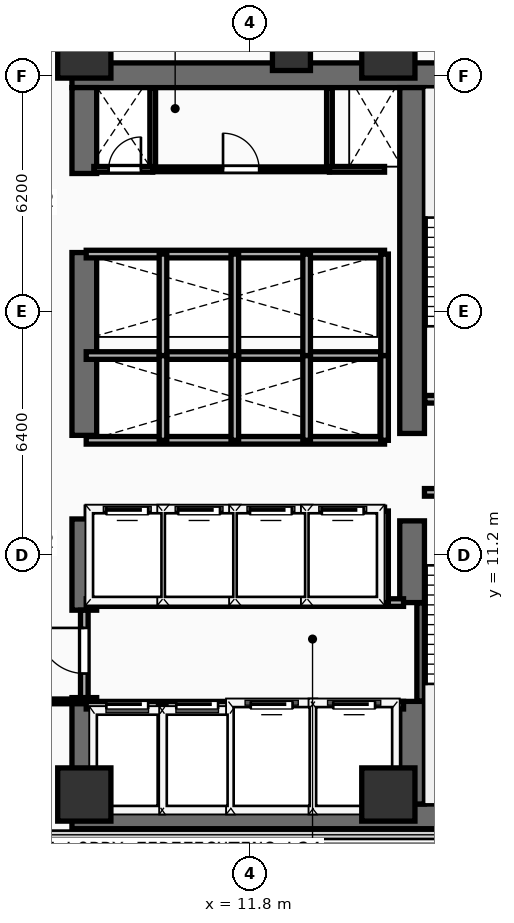
"""IFC4 building model, lengths in metres.
Left out: names, types, materials, properties, quantities, classifications, styles, units other than length and angle.
Written with IfcOpenShell. Run it as: python <this file> out.ifc"""

import sys

from ifc_helpers import new_model, si_unit, direction, frame, frame_2d, origin, origin_2d, place, context, subcontext, project, spatial, rectangle, extrude, element, fill, save


model = new_model("IFC4")
c1 = context("Model", 3, precision=1e-05, world=origin(), true_north=direction((0.0, 1.0)))
c2 = subcontext(c1, "Body", "Model", "MODEL_VIEW")
j1 = project(units=[si_unit("LENGTHUNIT", "METRE"), si_unit("PLANEANGLEUNIT", "RADIAN")], contexts=[c1])
p1 = place(None, origin())
s1 = spatial("IfcSite", under=j1, at=p1, CompositionType="ELEMENT")
p2 = place(p1, origin())
s2 = spatial("IfcBuilding", under=s1, at=p2, CompositionType="ELEMENT")
p3 = place(p2, frame((0.0, 0.0, 95.5)))
s3 = spatial("IfcBuildingStorey", under=s2, at=p3, CompositionType="ELEMENT", Elevation=95.5)
for number, where, z_axis, x_axis in (
    (1, (7.125, 4.325, 0.0), (0.0, 0.0, 1.0), (1.0, 0.0, 0.0)),
    (2, (7.125, 23.825, 0.0), (0.0, 0.0, 1.0), (1.0, 0.0, 0.0)),
):
    element("IfcWall", number, at=place(p3, frame(where, z_axis=z_axis, x_axis=x_axis)), inside=s3, PredefinedType="SHEAR", context=c2, shape_type="SweptSolid", body=[
        extrude(rectangle(XDim=14.0, YDim=0.65, at=frame_2d((7.0, 0.0))), origin(), (0.0, 0.0, 1.0), 3.54),
    ])
p4 = place(p3, frame((7.45, 4.65, 0.0), z_axis=(0.0, 0.0, 1.0), x_axis=(0.0, 1.0, 0.0)))
e3 = element("IfcWall", 3, at=p4, inside=s3, PredefinedType="SHEAR", context=c2, shape_type="SweptSolid", body=[
    extrude(rectangle(XDim=2.8, YDim=0.65, at=frame_2d((1.4, 0.0))), origin(), (0.0, 0.0, 1.0), 3.54),
])
p5 = place(p3, frame((7.45, 9.75, 0.0), z_axis=(0.0, 0.0, 1.0), x_axis=(0.0, 1.0, 0.0)))
e4 = element("IfcWall", 4, at=p5, inside=s3, PredefinedType="SHEAR", context=c2, shape_type="SweptSolid", body=[
    extrude(rectangle(XDim=2.4, YDim=0.65, at=frame_2d((1.2, 0.0))), origin(), (0.0, 0.0, 1.0), 3.54),
])
p6 = place(p3, frame((7.45, 14.35, 0.0), z_axis=(0.0, 0.0, 1.0), x_axis=(0.0, 1.0, 0.0)))
e5 = element("IfcWall", 5, at=p6, inside=s3, PredefinedType="SHEAR", context=c2, shape_type="SweptSolid", body=[
    extrude(rectangle(XDim=4.81, YDim=0.65, at=frame_2d((2.405, 0.0))), origin(), (0.0, 0.0, 1.0), 3.54),
])
p7 = place(p3, frame((7.45, 21.24, 0.0), z_axis=(0.0, 0.0, 1.0), x_axis=(0.0, 1.0, 0.0)))
e6 = element("IfcWall", 6, at=p7, inside=s3, PredefinedType="SHEAR", context=c2, shape_type="SweptSolid", body=[
    extrude(rectangle(XDim=2.26, YDim=0.65, at=frame_2d((1.13, 0.0))), origin(), (0.0, 0.0, 1.0), 3.54),
])
p8 = place(p3, frame((16.075, 4.65, 0.0), z_axis=(0.0, 0.0, 1.0), x_axis=(0.0, 1.0, 0.0)))
e7 = element("IfcWall", 7, at=p8, inside=s3, PredefinedType="SHEAR", context=c2, shape_type="SweptSolid", body=[
    extrude(rectangle(XDim=2.7, YDim=0.65, at=frame_2d((1.35, 0.0))), origin(), (0.0, 0.0, 1.0), 3.54),
])
p9 = place(p3, frame((16.075, 9.95, 0.0), z_axis=(0.0, 0.0, 1.0), x_axis=(0.0, 1.0, 0.0)))
e8 = element("IfcWall", 8, at=p9, inside=s3, PredefinedType="SHEAR", context=c2, shape_type="SweptSolid", body=[
    extrude(rectangle(XDim=2.15, YDim=0.65, at=frame_2d((1.075, 0.0))), origin(), (0.0, 0.0, 1.0), 3.54),
])
p10 = place(p3, frame((16.075, 14.4, 0.0), z_axis=(0.0, 0.0, 1.0), x_axis=(0.0, 1.0, 0.0)))
e9 = element("IfcWall", 9, at=p10, inside=s3, PredefinedType="SHEAR", context=c2, shape_type="SweptSolid", body=[
    extrude(rectangle(XDim=9.1, YDim=0.65, at=frame_2d((4.55, 0.0))), origin(), (0.0, 0.0, 1.0), 3.54),
])
for number, where, z_axis, x_axis in (
    (10, (7.45, 4.9, 0.0), (0.0, 0.0, 1.0), (1.0, 0.0, 0.0)),
    (11, (15.45, 4.9, 0.0), (0.0, 0.0, 1.0), (1.0, 0.0, 0.0)),
    (12, (7.45, 24.45, 0.0), (0.0, 0.0, 1.0), (1.0, 0.0, 0.0)),
    (13, (15.45, 24.45, 0.0), (0.0, 0.0, 1.0), (1.0, 0.0, 0.0)),
):
    element("IfcColumn", number, at=place(p3, frame(where, z_axis=z_axis, x_axis=x_axis)), inside=s3, PredefinedType="COLUMN", context=c2, shape_type="SweptSolid", body=[
        extrude(rectangle(XDim=1.4, YDim=1.4, at=origin_2d()), origin(), (0.0, 0.0, 1.0), 3.54),
    ])
p11 = place(p3, frame((12.9, 24.45, 0.0), z_axis=(0.0, 0.0, 1.0), x_axis=(1.0, 0.0, 0.0)))
e14 = element("IfcColumn", 14, at=p11, inside=s3, PredefinedType="COLUMN", context=c2, shape_type="SweptSolid", body=[
    extrude(rectangle(XDim=1.0, YDim=1.0, at=origin_2d()), origin(), (0.0, 0.0, 1.0), 3.54),
])
p12 = place(p3, frame((16.3, 7.36, 0.0), z_axis=(0.0, 0.0, 1.0), x_axis=(0.0, 1.0, 0.0)))
e15 = element("IfcWall", 15, at=p12, inside=s3, PredefinedType="SHEAR", context=c2, shape_type="SweptSolid", body=[
    extrude(rectangle(XDim=2.58, YDim=0.2, at=frame_2d((1.29, 0.0))), origin(), (0.0, 0.0, 1.0), 3.54),
])
p13 = place(p3, frame((16.4, 12.85, 0.0), z_axis=(0.0, 0.0, 1.0), x_axis=(1.0, 0.0, 0.0)))
e16 = element("IfcWall", 16, at=p13, inside=s3, PredefinedType="PARTITIONING", context=c2, shape_type="SweptSolid", body=[
    extrude(rectangle(XDim=3.96, YDim=0.2, at=frame_2d((1.98, 0.0))), origin(), (0.0, 0.0, 1.0), 3.54),
])
p14 = place(p13, frame((1.304, 0.0, 0.0)))
e17 = element("IfcOpeningElement", 17, at=p14, cuts=e16, PredefinedType="OPENING", context=c2, shape_type="SweptSolid", body=[
    extrude(rectangle(XDim=1.1, YDim=2.2, at=frame_2d((0.55, 1.1))), frame((0.0, 0.11, 0.0), z_axis=(0.0, -1.0, 0.0), x_axis=(1.0, 0.0, 0.0)), (0.0, 0.0, 1.0), 0.22),
])
p15 = place(p3, frame((16.41, 15.3, 0.0), z_axis=(0.0, 0.0, 1.0), x_axis=(1.0, 0.0, 0.0)))
e18 = element("IfcWall", 18, at=p15, inside=s3, PredefinedType="PARTITIONING", context=c2, shape_type="SweptSolid", body=[
    extrude(rectangle(XDim=3.95, YDim=0.2, at=frame_2d((1.975, 0.0))), origin(), (0.0, 0.0, 1.0), 3.54),
])
p16 = place(p15, frame((1.294, 0.0, 0.0)))
e19 = element("IfcOpeningElement", 19, at=p16, cuts=e18, PredefinedType="OPENING", context=c2, shape_type="SweptSolid", body=[
    extrude(rectangle(XDim=1.1, YDim=2.2, at=frame_2d((0.55, 1.1))), frame((0.0, 0.11, 0.0), z_axis=(0.0, -1.0, 0.0), x_axis=(1.0, 0.0, 0.0)), (0.0, 0.0, 1.0), 0.22),
])
p17 = place(p3, frame((7.5, 7.25, 0.0), z_axis=(0.0, 0.0, 1.0), x_axis=(1.0, 0.0, 0.0)))
e20 = element("IfcWall", 20, at=p17, inside=s3, PredefinedType="PARTITIONING", context=c2, shape_type="SweptSolid", body=[
    extrude(rectangle(XDim=8.35, YDim=0.2, at=frame_2d((4.175, 0.0))), origin(), (0.0, 0.0, 1.0), 3.54),
])
p18 = place(p17, frame((0.53, 0.0, 0.0)))
e21 = element("IfcOpeningElement", 21, at=p18, cuts=e20, PredefinedType="OPENING", context=c2, shape_type="SweptSolid", body=[
    extrude(rectangle(XDim=1.1, YDim=2.2, at=frame_2d((0.55, 1.1))), frame((0.0, 0.11, 0.0), z_axis=(0.0, -1.0, 0.0), x_axis=(1.0, 0.0, 0.0)), (0.0, 0.0, 1.0), 0.22),
])
p19 = place(p17, frame((2.37, 0.0, 0.0)))
e22 = element("IfcOpeningElement", 22, at=p19, cuts=e20, PredefinedType="OPENING", context=c2, shape_type="SweptSolid", body=[
    extrude(rectangle(XDim=1.1, YDim=2.2, at=frame_2d((0.55, 1.1))), frame((0.0, 0.11, 0.0), z_axis=(0.0, -1.0, 0.0), x_axis=(1.0, 0.0, 0.0)), (0.0, 0.0, 1.0), 0.22),
])
p20 = place(p17, frame((4.33, 0.0, 0.0)))
e23 = element("IfcOpeningElement", 23, at=p20, cuts=e20, PredefinedType="OPENING", context=c2, shape_type="SweptSolid", body=[
    extrude(rectangle(XDim=1.1, YDim=2.2, at=frame_2d((0.55, 1.1))), frame((0.0, 0.11, 0.0), z_axis=(0.0, -1.0, 0.0), x_axis=(1.0, 0.0, 0.0)), (0.0, 0.0, 1.0), 0.22),
])
p21 = place(p17, frame((6.5, 0.0, 0.0)))
e24 = element("IfcOpeningElement", 24, at=p21, cuts=e20, PredefinedType="OPENING", context=c2, shape_type="SweptSolid", body=[
    extrude(rectangle(XDim=1.1, YDim=2.2, at=frame_2d((0.55, 1.1))), frame((0.0, 0.11, 0.0), z_axis=(0.0, -1.0, 0.0), x_axis=(1.0, 0.0, 0.0)), (0.0, 0.0, 1.0), 0.22),
])
p22 = place(p3, frame((7.5, 9.95, 0.0), z_axis=(0.0, 0.0, 1.0), x_axis=(1.0, 0.0, 0.0)))
e25 = element("IfcWall", 25, at=p22, inside=s3, PredefinedType="PARTITIONING", context=c2, shape_type="SweptSolid", body=[
    extrude(rectangle(XDim=8.35, YDim=0.2, at=frame_2d((4.175, 0.0))), origin(), (0.0, 0.0, 1.0), 3.54),
])
for number, where, z_axis, x_axis in (
    (26, (9.5, 4.45, 0.0), (0.0, 0.0, 1.0), (0.0, 1.0, 0.0)),
    (27, (11.36, 4.45, 0.0), (0.0, 0.0, 1.0), (0.0, 1.0, 0.0)),
    (28, (13.46, 4.45, 0.0), (0.0, 0.0, 1.0), (0.0, 1.0, 0.0)),
):
    element("IfcWall", number, at=place(p3, frame(where, z_axis=z_axis, x_axis=x_axis)), inside=s3, PredefinedType="PARTITIONING", context=c2, shape_type="SweptSolid", body=[
        extrude(rectangle(XDim=2.8, YDim=0.2, at=frame_2d((1.4, 0.0))), origin(), (0.0, 0.0, 1.0), 3.54),
    ])
p23 = place(p3, frame((7.45, 7.45, 0.0), z_axis=(0.0, 0.0, 1.0), x_axis=(0.0, 1.0, 0.0)))
e29 = element("IfcWall", 29, at=p23, inside=s3, PredefinedType="PARTITIONING", context=c2, shape_type="SweptSolid", body=[
    extrude(rectangle(XDim=2.3, YDim=0.2, at=frame_2d((1.15, 0.0))), origin(), (0.0, 0.0, 1.0), 2.52),
])
p24 = place(p23, frame((0.633, 0.0, 0.0)))
e30 = element("IfcOpeningElement", 30, at=p24, cuts=e29, PredefinedType="OPENING", context=c2, shape_type="SweptSolid", body=[
    extrude(rectangle(XDim=1.2, YDim=2.25, at=frame_2d((0.6, 1.125))), frame((0.0, 0.11, 0.0), z_axis=(0.0, -1.0, 0.0), x_axis=(1.0, 0.0, 0.0)), (0.0, 0.0, 1.0), 0.22),
])
p25 = place(p3, frame((7.5, 12.36, 0.0), z_axis=(0.0, 0.0, 1.0), x_axis=(1.0, 0.0, 0.0)))
e31 = element("IfcWall", 31, at=p25, inside=s3, PredefinedType="PARTITIONING", context=c2, shape_type="SweptSolid", body=[
    extrude(rectangle(XDim=7.85, YDim=0.2, at=frame_2d((3.925, 0.0))), origin(), (0.0, 0.0, 1.0), 3.54),
])
p26 = place(p25, frame((0.53, 0.0, 0.0)))
e32 = element("IfcOpeningElement", 32, at=p26, cuts=e31, PredefinedType="OPENING", context=c2, shape_type="SweptSolid", body=[
    extrude(rectangle(XDim=1.1, YDim=2.2, at=frame_2d((0.55, 1.1))), frame((0.0, 0.11, 0.0), z_axis=(0.0, -1.0, 0.0), x_axis=(1.0, 0.0, 0.0)), (0.0, 0.0, 1.0), 0.22),
])
p27 = place(p25, frame((2.42, 0.0, 0.0)))
e33 = element("IfcOpeningElement", 33, at=p27, cuts=e31, PredefinedType="OPENING", context=c2, shape_type="SweptSolid", body=[
    extrude(rectangle(XDim=1.1, YDim=2.2, at=frame_2d((0.55, 1.1))), frame((0.0, 0.11, 0.0), z_axis=(0.0, -1.0, 0.0), x_axis=(1.0, 0.0, 0.0)), (0.0, 0.0, 1.0), 0.22),
])
p28 = place(p25, frame((4.31, 0.0, 0.0)))
e34 = element("IfcOpeningElement", 34, at=p28, cuts=e31, PredefinedType="OPENING", context=c2, shape_type="SweptSolid", body=[
    extrude(rectangle(XDim=1.1, YDim=2.2, at=frame_2d((0.55, 1.1))), frame((0.0, 0.11, 0.0), z_axis=(0.0, -1.0, 0.0), x_axis=(1.0, 0.0, 0.0)), (0.0, 0.0, 1.0), 0.22),
])
p29 = place(p25, frame((6.2, 0.0, 0.0)))
e35 = element("IfcOpeningElement", 35, at=p29, cuts=e31, PredefinedType="OPENING", context=c2, shape_type="SweptSolid", body=[
    extrude(rectangle(XDim=1.1, YDim=2.2, at=frame_2d((0.55, 1.1))), frame((0.0, 0.11, 0.0), z_axis=(0.0, -1.0, 0.0), x_axis=(1.0, 0.0, 0.0)), (0.0, 0.0, 1.0), 0.22),
])
for number, where, z_axis, x_axis in (
    (36, (15.35, 9.95, 0.0), (0.0, 0.0, 1.0), (0.0, 1.0, 0.0)),
    (37, (9.52, 9.95, 0.0), (0.0, 0.0, 1.0), (0.0, 1.0, 0.0)),
    (38, (11.41, 9.95, 0.0), (0.0, 0.0, 1.0), (0.0, 1.0, 0.0)),
    (39, (13.3, 9.95, 0.0), (0.0, 0.0, 1.0), (0.0, 1.0, 0.0)),
):
    element("IfcWall", number, at=place(p3, frame(where, z_axis=z_axis, x_axis=x_axis)), inside=s3, PredefinedType="PARTITIONING", context=c2, shape_type="SweptSolid", body=[
        extrude(rectangle(XDim=2.41, YDim=0.2, at=frame_2d((1.205, 0.0))), origin(), (0.0, 0.0, 1.0), 3.54),
    ])
for number, where, z_axis, x_axis in (
    (40, (7.5, 14.22, 0.0), (0.0, 0.0, 1.0), (1.0, 0.0, 0.0)),
    (41, (7.5, 16.45, 0.0), (0.0, 0.0, 1.0), (1.0, 0.0, 0.0)),
):
    element("IfcWall", number, at=place(p3, frame(where, z_axis=z_axis, x_axis=x_axis)), inside=s3, PredefinedType="PARTITIONING", context=c2, shape_type="SweptSolid", body=[
        extrude(rectangle(XDim=7.85, YDim=0.2, at=frame_2d((3.925, 0.0))), origin(), (0.0, 0.0, 1.0), 3.54),
    ])
for number, where, z_axis, x_axis in (
    (42, (15.35, 14.22, 0.0), (0.0, 0.0, 1.0), (0.0, 1.0, 0.0)),
    (43, (9.52, 14.22, 0.0), (0.0, 0.0, 1.0), (0.0, 1.0, 0.0)),
    (44, (11.41, 14.22, 0.0), (0.0, 0.0, 1.0), (0.0, 1.0, 0.0)),
    (45, (13.3, 14.22, 0.0), (0.0, 0.0, 1.0), (0.0, 1.0, 0.0)),
):
    element("IfcWall", number, at=place(p3, frame(where, z_axis=z_axis, x_axis=x_axis)), inside=s3, PredefinedType="PARTITIONING", context=c2, shape_type="SweptSolid", body=[
        extrude(rectangle(XDim=2.23, YDim=0.2, at=frame_2d((1.115, 0.0))), origin(), (0.0, 0.0, 1.0), 3.54),
    ])
p30 = place(p3, frame((7.5, 19.12, 0.0), z_axis=(0.0, 0.0, 1.0), x_axis=(1.0, 0.0, 0.0)))
e46 = element("IfcWall", 46, at=p30, inside=s3, PredefinedType="PARTITIONING", context=c2, shape_type="SweptSolid", body=[
    extrude(rectangle(XDim=7.85, YDim=0.2, at=frame_2d((3.925, 0.0))), origin(), (0.0, 0.0, 1.0), 3.54),
])
for number, where, z_axis, x_axis in (
    (47, (15.35, 16.45, 0.0), (0.0, 0.0, 1.0), (0.0, 1.0, 0.0)),
    (48, (9.52, 16.45, 0.0), (0.0, 0.0, 1.0), (0.0, 1.0, 0.0)),
    (49, (11.41, 16.45, 0.0), (0.0, 0.0, 1.0), (0.0, 1.0, 0.0)),
    (50, (13.3, 16.45, 0.0), (0.0, 0.0, 1.0), (0.0, 1.0, 0.0)),
):
    element("IfcWall", number, at=place(p3, frame(where, z_axis=z_axis, x_axis=x_axis)), inside=s3, PredefinedType="PARTITIONING", context=c2, shape_type="SweptSolid", body=[
        extrude(rectangle(XDim=2.67, YDim=0.2, at=frame_2d((1.335, 0.0))), origin(), (0.0, 0.0, 1.0), 3.54),
    ])
for number, where, z_axis, x_axis in (
    (51, (9.25, 21.35, 0.0), (0.0, 0.0, 1.0), (0.0, 1.0, 0.0)),
    (52, (13.9, 21.35, 0.0), (0.0, 0.0, 1.0), (0.0, 1.0, 0.0)),
):
    element("IfcWall", number, at=place(p3, frame(where, z_axis=z_axis, x_axis=x_axis)), inside=s3, PredefinedType="PARTITIONING", context=c2, shape_type="SweptSolid", body=[
        extrude(rectangle(XDim=2.13, YDim=0.15, at=frame_2d((1.065, 0.0))), origin(), (0.0, 0.0, 1.0), 3.54),
    ])
p31 = place(p3, frame((7.7, 21.35, 0.0), z_axis=(0.0, 0.0, 1.0), x_axis=(1.0, 0.0, 0.0)))
e53 = element("IfcWall", 53, at=p31, inside=s3, PredefinedType="PARTITIONING", context=c2, shape_type="SweptSolid", body=[
    extrude(rectangle(XDim=1.55, YDim=0.15, at=frame_2d((0.775, 0.0))), origin(), (0.0, 0.0, 1.0), 3.54),
])
p32 = place(p31, frame((0.39, 0.0, 0.0)))
e54 = element("IfcOpeningElement", 54, at=p32, cuts=e53, PredefinedType="OPENING", context=c2, shape_type="SweptSolid", body=[
    extrude(rectangle(XDim=0.85, YDim=2.15, at=frame_2d((0.425, 1.075))), frame((0.0, 0.085, 0.0), z_axis=(0.0, -1.0, 0.0), x_axis=(1.0, 0.0, 0.0)), (0.0, 0.0, 1.0), 0.17),
])
p33 = place(p3, frame((13.9, 21.35, 0.0), z_axis=(0.0, 0.0, 1.0), x_axis=(1.0, 0.0, 0.0)))
e55 = element("IfcWall", 55, at=p33, inside=s3, PredefinedType="PARTITIONING", context=c2, shape_type="SweptSolid", body=[
    extrude(rectangle(XDim=1.45, YDim=0.15, at=frame_2d((0.725, 0.0))), origin(), (0.0, 0.0, 1.0), 3.54),
])
p34 = place(p3, frame((9.25, 21.35, 0.0), z_axis=(0.0, 0.0, 1.0), x_axis=(1.0, 0.0, 0.0)))
e56 = element("IfcWall", 56, at=p34, inside=s3, PredefinedType="PARTITIONING", context=c2, shape_type="SweptSolid", body=[
    extrude(rectangle(XDim=4.65, YDim=0.125, at=frame_2d((2.325, 0.0))), origin(), (0.0, 0.0, 1.0), 3.54),
])
p35 = place(p34, frame((1.85, 0.0, 0.0)))
e57 = element("IfcOpeningElement", 57, at=p35, cuts=e56, PredefinedType="OPENING", context=c2, shape_type="SweptSolid", body=[
    extrude(rectangle(XDim=0.95, YDim=2.15, at=frame_2d((0.475, 1.075))), frame((0.0, 0.073, 0.0), z_axis=(0.0, -1.0, 0.0), x_axis=(1.0, 0.0, 0.0)), (0.0, 0.0, 1.0), 0.145),
])
p36 = place(p3, frame((1.64, 7.35, 0.0), z_axis=(0.0, 0.0, 1.0), x_axis=(1.0, 0.0, 0.0)))
e58 = element("IfcWall", 58, at=p36, inside=s3, PredefinedType="PARTITIONING", context=c2, shape_type="SweptSolid", body=[
    extrude(rectangle(XDim=5.76, YDim=0.125, at=frame_2d((2.88, 0.0))), origin(), (0.0, 0.0, 1.0), 3.54),
])
p37 = place(p36, frame((4.087, 0.0, 0.0)))
e59 = element("IfcOpeningElement", 59, at=p37, cuts=e58, PredefinedType="OPENING", context=c2, shape_type="SweptSolid", body=[
    extrude(rectangle(XDim=0.85, YDim=2.15, at=frame_2d((0.425, 1.075))), frame((0.0, 0.073, 0.0), z_axis=(0.0, -1.0, 0.0), x_axis=(1.0, 0.0, 0.0)), (0.0, 0.0, 1.0), 0.145),
])
p38 = place(p18, origin())
e60 = element("IfcDoor", 60, at=p38, inside=s3, OperationType="SLIDING_TO_LEFT", PredefinedType="DOOR", context=c2, shape_type="SweptSolid", body=[
    extrude(rectangle(XDim=1.1, YDim=2.2, at=frame_2d((0.55, 1.1))), frame((0.0, 0.025, 0.0), z_axis=(0.0, -1.0, 0.0), x_axis=(1.0, 0.0, 0.0)), (0.0, 0.0, 1.0), 0.05),
])
fill(e21, e60)
p39 = place(p19, origin())
e61 = element("IfcDoor", 61, at=p39, inside=s3, OperationType="SLIDING_TO_LEFT", PredefinedType="DOOR", context=c2, shape_type="SweptSolid", body=[
    extrude(rectangle(XDim=1.1, YDim=2.2, at=frame_2d((0.55, 1.1))), frame((0.0, 0.025, 0.0), z_axis=(0.0, -1.0, 0.0), x_axis=(1.0, 0.0, 0.0)), (0.0, 0.0, 1.0), 0.05),
])
fill(e22, e61)
p40 = place(p20, origin())
e62 = element("IfcDoor", 62, at=p40, inside=s3, OperationType="SLIDING_TO_LEFT", PredefinedType="DOOR", context=c2, shape_type="SweptSolid", body=[
    extrude(rectangle(XDim=1.1, YDim=2.2, at=frame_2d((0.55, 1.1))), frame((0.0, 0.025, 0.0), z_axis=(0.0, -1.0, 0.0), x_axis=(1.0, 0.0, 0.0)), (0.0, 0.0, 1.0), 0.05),
])
fill(e23, e62)
p41 = place(p21, origin())
e63 = element("IfcDoor", 63, at=p41, inside=s3, OperationType="SLIDING_TO_LEFT", PredefinedType="DOOR", context=c2, shape_type="SweptSolid", body=[
    extrude(rectangle(XDim=1.1, YDim=2.2, at=frame_2d((0.55, 1.1))), frame((0.0, 0.025, 0.0), z_axis=(0.0, -1.0, 0.0), x_axis=(1.0, 0.0, 0.0)), (0.0, 0.0, 1.0), 0.05),
])
fill(e24, e63)
p42 = place(p24, frame((1.2, 0.0, 0.0), z_axis=(0.0, 0.0, 1.0), x_axis=(-1.0, 0.0, 0.0)))
e64 = element("IfcDoor", 64, at=p42, inside=s3, OperationType="SINGLE_SWING_LEFT", PredefinedType="DOOR", context=c2, shape_type="SweptSolid", body=[
    extrude(rectangle(XDim=1.2, YDim=2.25, at=frame_2d((0.6, 1.125))), frame((0.0, 0.025, 0.0), z_axis=(0.0, -1.0, 0.0), x_axis=(1.0, 0.0, 0.0)), (0.0, 0.0, 1.0), 0.05),
])
fill(e30, e64)
p43 = place(p26, origin())
e65 = element("IfcDoor", 65, at=p43, inside=s3, OperationType="SLIDING_TO_LEFT", PredefinedType="DOOR", context=c2, shape_type="SweptSolid", body=[
    extrude(rectangle(XDim=1.1, YDim=2.2, at=frame_2d((0.55, 1.1))), frame((0.0, 0.025, 0.0), z_axis=(0.0, -1.0, 0.0), x_axis=(1.0, 0.0, 0.0)), (0.0, 0.0, 1.0), 0.05),
])
fill(e32, e65)
p44 = place(p27, origin())
e66 = element("IfcDoor", 66, at=p44, inside=s3, OperationType="SLIDING_TO_LEFT", PredefinedType="DOOR", context=c2, shape_type="SweptSolid", body=[
    extrude(rectangle(XDim=1.1, YDim=2.2, at=frame_2d((0.55, 1.1))), frame((0.0, 0.025, 0.0), z_axis=(0.0, -1.0, 0.0), x_axis=(1.0, 0.0, 0.0)), (0.0, 0.0, 1.0), 0.05),
])
fill(e33, e66)
p45 = place(p28, origin())
e67 = element("IfcDoor", 67, at=p45, inside=s3, OperationType="SLIDING_TO_LEFT", PredefinedType="DOOR", context=c2, shape_type="SweptSolid", body=[
    extrude(rectangle(XDim=1.1, YDim=2.2, at=frame_2d((0.55, 1.1))), frame((0.0, 0.025, 0.0), z_axis=(0.0, -1.0, 0.0), x_axis=(1.0, 0.0, 0.0)), (0.0, 0.0, 1.0), 0.05),
])
fill(e34, e67)
p46 = place(p29, origin())
e68 = element("IfcDoor", 68, at=p46, inside=s3, OperationType="SLIDING_TO_LEFT", PredefinedType="DOOR", context=c2, shape_type="SweptSolid", body=[
    extrude(rectangle(XDim=1.1, YDim=2.2, at=frame_2d((0.55, 1.1))), frame((0.0, 0.025, 0.0), z_axis=(0.0, -1.0, 0.0), x_axis=(1.0, 0.0, 0.0)), (0.0, 0.0, 1.0), 0.05),
])
fill(e35, e68)
p47 = place(p32, origin())
e69 = element("IfcDoor", 69, at=p47, inside=s3, OperationType="SINGLE_SWING_RIGHT", PredefinedType="DOOR", context=c2, shape_type="SweptSolid", body=[
    extrude(rectangle(XDim=0.85, YDim=2.15, at=frame_2d((0.425, 1.075))), frame((0.0, 0.025, 0.0), z_axis=(0.0, -1.0, 0.0), x_axis=(1.0, 0.0, 0.0)), (0.0, 0.0, 1.0), 0.05),
])
fill(e54, e69)
p48 = place(p35, origin())
e70 = element("IfcDoor", 70, at=p48, inside=s3, OperationType="SINGLE_SWING_LEFT", PredefinedType="DOOR", context=c2, shape_type="SweptSolid", body=[
    extrude(rectangle(XDim=0.95, YDim=2.15, at=frame_2d((0.475, 1.075))), frame((0.0, 0.025, 0.0), z_axis=(0.0, -1.0, 0.0), x_axis=(1.0, 0.0, 0.0)), (0.0, 0.0, 1.0), 0.05),
])
fill(e57, e70)
save(model, sys.argv[1])
